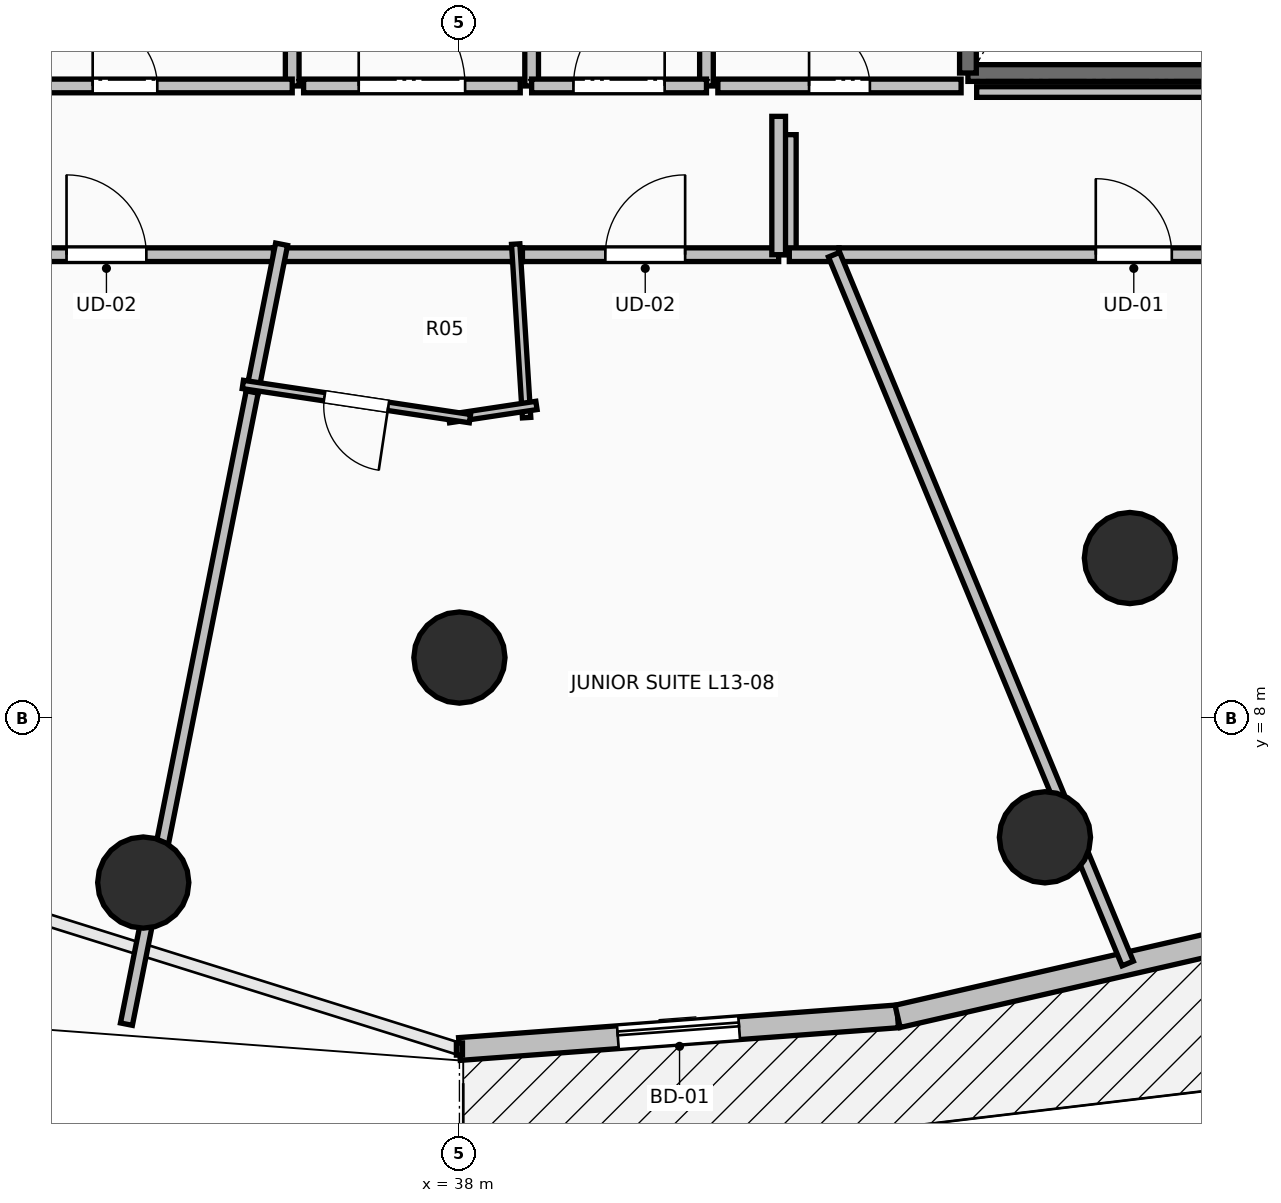
"""IFC4 building model, lengths in metres.
Left out: names, types, materials, properties, quantities, classifications, styles, units other than length and angle.
Written with IfcOpenShell. Run it as: python <this file> out.ifc"""

import sys

from ifc_helpers import new_model, si_unit, direction, frame, frame_2d, origin, origin_2d, place, context, subcontext, project, spatial, rectangle, circle, extrude, element, fill, save


model = new_model("IFC4")
c1 = context("Model", 3, precision=1e-05, world=origin(), true_north=direction((0.0, 1.0)))
c2 = subcontext(c1, "Body", "Model", "MODEL_VIEW")
j1 = project(units=[si_unit("LENGTHUNIT", "METRE"), si_unit("PLANEANGLEUNIT", "RADIAN")], contexts=[c1])
p1 = place(None, origin())
s1 = spatial("IfcSite", under=j1, at=p1, CompositionType="ELEMENT")
p2 = place(p1, origin())
s2 = spatial("IfcBuilding", under=s1, at=p2, CompositionType="ELEMENT")
p3 = place(p2, frame((0.0, 0.0, 52.0)))
s3 = spatial("IfcBuildingStorey", under=s2, at=p3, CompositionType="ELEMENT", Elevation=52.0)
for number, where, z_axis, x_axis in (
    (1, (38.0, 8.8, 0.0), (0.0, 0.0, 1.0), (0.0, -1.0, 0.0)),
    (2, (46.821, 10.109, 0.0), (0.0, 0.0, 1.0), (0.383, -0.924, 0.0)),
    (3, (33.84, 5.84, 0.0), (0.0, 0.0, 1.0), (0.0, -1.0, 0.0)),
    (4, (45.703, 6.435, 0.0), (0.0, 0.0, 1.0), (0.383, -0.924, 0.0)),
):
    element("IfcColumn", number, at=place(p3, frame(where, z_axis=z_axis, x_axis=x_axis)), inside=s3, PredefinedType="COLUMN", context=c2, shape_type="SweptSolid", body=[
        extrude(circle(Radius=0.6, at=origin_2d()), origin(), (0.0, 0.0, 1.0), 3.5),
    ])
p4 = place(p3, frame((38.0, 3.65, 0.0), z_axis=(0.0, 0.0, 1.0), x_axis=(0.99723690101, 0.074287032943, 0.0)))
e5 = element("IfcWall", 5, at=p4, inside=s3, PredefinedType="STANDARD", context=c2, shape_type="SweptSolid", body=[
    extrude(rectangle(XDim=5.781, YDim=0.3, at=frame_2d((2.89, 0.0))), origin(), (0.0, 0.0, 1.0), 3.24),
])
p5 = place(p4, frame((2.09, 0.0, 0.0)))
e6 = element("IfcOpeningElement", 6, at=p5, cuts=e5, PredefinedType="OPENING", context=c2, shape_type="SweptSolid", body=[
    extrude(rectangle(XDim=1.6, YDim=2.3, at=frame_2d((0.8, 1.15))), frame((0.0, 0.165, 0.0), z_axis=(0.0, -1.0, 0.0), x_axis=(1.0, 0.0, 0.0)), (0.0, 0.0, 1.0), 0.33),
])
p6 = place(p3, frame((43.765, 4.079, 0.0), z_axis=(0.0, 0.0, 1.0), x_axis=(0.974671141646, 0.223642942305, 0.0)))
e7 = element("IfcWall", 7, at=p6, inside=s3, PredefinedType="STANDARD", context=c2, shape_type="SweptSolid", body=[
    extrude(rectangle(XDim=5.688, YDim=0.3, at=frame_2d((2.844, 0.0))), origin(), (0.0, 0.0, 1.0), 3.24),
])
p7 = place(p3, frame((48.06, 16.49, 0.0), z_axis=(0.0, 0.0, 1.0), x_axis=(-1.0, 0.0, 0.0)))
e8 = element("IfcWall", 8, at=p7, inside=s3, PredefinedType="SOLIDWALL", context=c2, shape_type="SweptSolid", body=[
    extrude(rectangle(XDim=3.37, YDim=0.22, at=frame_2d((1.685, 0.0))), origin(), (0.0, 0.0, 1.0), 3.24),
])
p8 = place(p3, frame((44.69, 16.49, 0.0), z_axis=(0.0, 0.0, 1.0), x_axis=(0.0, 1.0, 0.0)))
e9 = element("IfcWall", 9, at=p8, inside=s3, PredefinedType="SOLIDWALL", context=c2, shape_type="SweptSolid", body=[
    extrude(rectangle(XDim=7.42, YDim=0.22, at=frame_2d((3.71, 0.0))), origin(), (0.0, 0.0, 1.0), 3.24),
])
p9 = place(p3, frame((41.25, 16.32, 0.0), z_axis=(0.0, 0.0, 1.0), x_axis=(0.0, 1.0, 0.0)))
e10 = element("IfcWall", 10, at=p9, inside=s3, PredefinedType="PARTITIONING", context=c2, shape_type="SweptSolid", body=[
    extrude(rectangle(XDim=3.985, YDim=0.18, at=frame_2d((1.992, 0.0))), origin(), (0.0, 0.0, 1.0), 3.24),
])
p10 = place(p9, frame((1.593, 0.0, 0.0)))
e11 = element("IfcOpeningElement", 11, at=p10, cuts=e10, PredefinedType="OPENING", context=c2, shape_type="SweptSolid", body=[
    extrude(rectangle(XDim=0.8, YDim=2.05, at=frame_2d((0.4, 1.025))), frame((0.0, 0.105, 0.0), z_axis=(0.0, -1.0, 0.0), x_axis=(1.0, 0.0, 0.0)), (0.0, 0.0, 1.0), 0.21),
])
p11 = place(p3, frame((38.95, 21.755, 0.0), z_axis=(0.0, 0.0, 1.0), x_axis=(0.0, -1.0, 0.0)))
e12 = element("IfcWall", 12, at=p11, inside=s3, PredefinedType="PARTITIONING", context=c2, shape_type="SweptSolid", body=[
    extrude(rectangle(XDim=5.435, YDim=0.18, at=frame_2d((2.717, 0.0))), origin(), (0.0, 0.0, 1.0), 3.24),
])
p12 = place(p11, frame((2.018, 0.0, 0.0)))
e13 = element("IfcOpeningElement", 13, at=p12, cuts=e12, PredefinedType="OPENING", context=c2, shape_type="SweptSolid", body=[
    extrude(rectangle(XDim=1.4, YDim=2.2, at=frame_2d((0.7, 1.1))), frame((0.0, 0.105, 0.0), z_axis=(0.0, -1.0, 0.0), x_axis=(1.0, 0.0, 0.0)), (0.0, 0.0, 1.0), 0.21),
])
p13 = place(p3, frame((38.95, 16.32, 0.0), z_axis=(0.0, 0.0, 1.0), x_axis=(1.0, 0.0, 0.0)))
e14 = element("IfcWall", 14, at=p13, inside=s3, PredefinedType="PARTITIONING", context=c2, shape_type="SweptSolid", body=[
    extrude(rectangle(XDim=2.3, YDim=0.18, at=frame_2d((1.15, 0.0))), origin(), (0.0, 0.0, 1.0), 3.24),
])
p14 = place(p13, frame((0.55, 0.0, 0.0)))
e15 = element("IfcOpeningElement", 15, at=p14, cuts=e14, PredefinedType="OPENING", context=c2, shape_type="SweptSolid", body=[
    extrude(rectangle(XDim=1.2, YDim=2.15, at=frame_2d((0.6, 1.075))), frame((0.0, 0.105, 0.0), z_axis=(0.0, -1.0, 0.0), x_axis=(1.0, 0.0, 0.0)), (0.0, 0.0, 1.0), 0.21),
])
p15 = place(p3, frame((41.4, 16.32, 0.0), z_axis=(0.0, 0.0, 1.0), x_axis=(1.0, 0.0, 0.0)))
e16 = element("IfcWall", 16, at=p15, inside=s3, PredefinedType="PARTITIONING", context=c2, shape_type="SweptSolid", body=[
    extrude(rectangle(XDim=3.2, YDim=0.18, at=frame_2d((1.6, 0.0))), origin(), (0.0, 0.0, 1.0), 3.24),
])
p16 = place(p15, frame((1.2, 0.0, 0.0)))
e17 = element("IfcOpeningElement", 17, at=p16, cuts=e16, PredefinedType="OPENING", context=c2, shape_type="SweptSolid", body=[
    extrude(rectangle(XDim=0.8, YDim=2.05, at=frame_2d((0.4, 1.025))), frame((0.0, 0.105, 0.0), z_axis=(0.0, -1.0, 0.0), x_axis=(1.0, 0.0, 0.0)), (0.0, 0.0, 1.0), 0.21),
])
p17 = place(p3, frame((35.8, 16.32, 0.0), z_axis=(0.0, 0.0, 1.0), x_axis=(0.0, 1.0, 0.0)))
e18 = element("IfcWall", 18, at=p17, inside=s3, PredefinedType="PARTITIONING", context=c2, shape_type="SweptSolid", body=[
    extrude(rectangle(XDim=5.13, YDim=0.18, at=frame_2d((2.565, 0.0))), origin(), (0.0, 0.0, 1.0), 3.24),
])
p18 = place(p3, frame((31.4, 16.32, 0.0), z_axis=(0.0, 0.0, 1.0), x_axis=(1.0, 0.0, 0.0)))
e19 = element("IfcWall", 19, at=p18, inside=s3, PredefinedType="PARTITIONING", context=c2, shape_type="SweptSolid", body=[
    extrude(rectangle(XDim=4.4, YDim=0.18, at=frame_2d((2.2, 0.0))), origin(), (0.0, 0.0, 1.0), 3.24),
])
p19 = place(p18, frame((1.775, 0.0, 0.0)))
e20 = element("IfcOpeningElement", 20, at=p19, cuts=e19, PredefinedType="OPENING", context=c2, shape_type="SweptSolid", body=[
    extrude(rectangle(XDim=0.85, YDim=2.1, at=frame_2d((0.425, 1.05))), frame((0.0, 0.105, 0.0), z_axis=(0.0, -1.0, 0.0), x_axis=(1.0, 0.0, 0.0)), (0.0, 0.0, 1.0), 0.21),
])
p20 = place(p3, frame((35.95, 16.32, 0.0), z_axis=(0.0, 0.0, 1.0), x_axis=(1.0, 0.0, 0.0)))
e21 = element("IfcWall", 21, at=p20, inside=s3, PredefinedType="PARTITIONING", context=c2, shape_type="SweptSolid", body=[
    extrude(rectangle(XDim=2.85, YDim=0.18, at=frame_2d((1.425, 0.0))), origin(), (0.0, 0.0, 1.0), 3.24),
])
p21 = place(p20, frame((0.725, 0.0, 0.0)))
e22 = element("IfcOpeningElement", 22, at=p21, cuts=e21, PredefinedType="OPENING", context=c2, shape_type="SweptSolid", body=[
    extrude(rectangle(XDim=1.4, YDim=2.2, at=frame_2d((0.7, 1.1))), frame((0.0, 0.105, 0.0), z_axis=(0.0, -1.0, 0.0), x_axis=(1.0, 0.0, 0.0)), (0.0, 0.0, 1.0), 0.21),
])
p22 = place(p3, frame((31.019, 14.1, 0.0), z_axis=(0.0, 0.0, 1.0), x_axis=(1.0, 0.0, 0.0)))
e23 = element("IfcWall", 23, at=p22, inside=s3, PredefinedType="PARTITIONING", context=c2, shape_type="SweptSolid", body=[
    extrude(rectangle(XDim=4.674, YDim=0.18, at=frame_2d((2.337, 0.0))), origin(), (0.0, 0.0, 1.0), 3.24),
])
p23 = place(p22, frame((1.812, 0.0, 0.0)))
e24 = element("IfcOpeningElement", 24, at=p23, cuts=e23, PredefinedType="OPENING", context=c2, shape_type="SweptSolid", body=[
    extrude(rectangle(XDim=1.05, YDim=2.2, at=frame_2d((0.525, 1.1))), frame((0.0, 0.105, 0.0), z_axis=(0.0, -1.0, 0.0), x_axis=(1.0, 0.0, 0.0)), (0.0, 0.0, 1.0), 0.21),
])
p24 = place(p3, frame((42.34, 15.679, 0.0), z_axis=(0.0, 0.0, 1.0), x_axis=(0.0, -1.0, 0.0)))
e25 = element("IfcWall", 25, at=p24, inside=s3, PredefinedType="PARTITIONING", context=c2, shape_type="SweptSolid", body=[
    extrude(rectangle(XDim=1.579, YDim=0.18, at=frame_2d((0.79, 0.0))), origin(), (0.0, 0.0, 1.0), 3.24),
])
p25 = place(p3, frame((42.34, 14.1, 0.0), z_axis=(0.0, 0.0, 1.0), x_axis=(1.0, 0.0, 0.0)))
e26 = element("IfcWall", 26, at=p25, inside=s3, PredefinedType="PARTITIONING", context=c2, shape_type="SweptSolid", body=[
    extrude(rectangle(XDim=0.654, YDim=0.18, at=frame_2d((0.327, 0.0))), origin(), (0.0, 0.0, 1.0), 3.24),
])
p26 = place(p3, frame((38.689, 14.1, 0.0), z_axis=(0.0, 0.0, 1.0), x_axis=(1.0, 0.0, 0.0)))
e27 = element("IfcWall", 27, at=p26, inside=s3, PredefinedType="PARTITIONING", context=c2, shape_type="SweptSolid", body=[
    extrude(rectangle(XDim=3.511, YDim=0.18, at=frame_2d((1.755, 0.0))), origin(), (0.0, 0.0, 1.0), 3.24),
])
p27 = place(p26, frame((1.23, 0.0, 0.0)))
e28 = element("IfcOpeningElement", 28, at=p27, cuts=e27, PredefinedType="OPENING", context=c2, shape_type="SweptSolid", body=[
    extrude(rectangle(XDim=1.05, YDim=2.2, at=frame_2d((0.525, 1.1))), frame((0.0, 0.105, 0.0), z_axis=(0.0, -1.0, 0.0), x_axis=(1.0, 0.0, 0.0)), (0.0, 0.0, 1.0), 0.21),
])
p28 = place(p3, frame((42.2, 14.1, 0.0), z_axis=(0.0, 0.0, 1.0), x_axis=(0.0, 1.0, 0.0)))
e29 = element("IfcWall", 29, at=p28, inside=s3, PredefinedType="PARTITIONING", context=c2, shape_type="SweptSolid", body=[
    extrude(rectangle(XDim=1.82, YDim=0.18, at=frame_2d((0.91, 0.0))), origin(), (0.0, 0.0, 1.0), 3.24),
])
p29 = place(p3, frame((35.553, 14.1, 0.0), z_axis=(0.0, 0.0, 1.0), x_axis=(1.0, 0.0, 0.0)))
e30 = element("IfcWall", 30, at=p29, inside=s3, PredefinedType="PARTITIONING", context=c2, shape_type="SweptSolid", body=[
    extrude(rectangle(XDim=3.276, YDim=0.18, at=frame_2d((1.638, 0.0))), origin(), (0.0, 0.0, 1.0), 3.24),
])
p30 = place(p3, frame((42.994, 14.1, 0.0), z_axis=(0.0, 0.0, 1.0), x_axis=(1.0, 0.0, 0.0)))
e31 = element("IfcWall", 31, at=p30, inside=s3, PredefinedType="PARTITIONING", context=c2, shape_type="SweptSolid", body=[
    extrude(rectangle(XDim=7.756, YDim=0.18, at=frame_2d((3.878, 0.0))), origin(), (0.0, 0.0, 1.0), 2.432),
])
p31 = place(p30, frame((3.378, 0.0, 0.0)))
e32 = element("IfcOpeningElement", 32, at=p31, cuts=e31, PredefinedType="OPENING", context=c2, shape_type="SweptSolid", body=[
    extrude(rectangle(XDim=1.0, YDim=2.15, at=frame_2d((0.5, 1.075))), frame((0.0, 0.105, 0.0), z_axis=(0.0, -1.0, 0.0), x_axis=(1.0, 0.0, 0.0)), (0.0, 0.0, 1.0), 0.21),
])
p32 = place(p3, frame((33.619, 3.977, 0.0), z_axis=(0.0, 0.0, 1.0), x_axis=(0.195151937053, 0.980773022398, 0.0)))
e33 = element("IfcWall", 33, at=p32, inside=s3, PredefinedType="PARTITIONING", context=c2, shape_type="SweptSolid", body=[
    extrude(rectangle(XDim=8.62, YDim=0.16, at=frame_2d((4.31, 0.0))), origin(), (0.0, 0.0, 1.0), 2.432),
])
p33 = place(p3, frame((35.274, 12.294, 0.0), z_axis=(0.0, 0.0, 1.0), x_axis=(0.194907646023, 0.980821599233, 0.0)))
e34 = element("IfcWall", 34, at=p33, inside=s3, PredefinedType="PARTITIONING", context=c2, shape_type="SweptSolid", body=[
    extrude(rectangle(XDim=1.982, YDim=0.16, at=frame_2d((0.991, 0.0))), origin(), (0.0, 0.0, 1.0), 2.886),
])
p34 = place(p3, frame((38.74, 14.24, 0.0), z_axis=(0.0, 0.0, 1.0), x_axis=(0.062743659702, -0.998029675494, 0.0)))
e35 = element("IfcWall", 35, at=p34, inside=s3, PredefinedType="PARTITIONING", context=c2, shape_type="SweptSolid", body=[
    extrude(rectangle(XDim=2.288, YDim=0.11, at=frame_2d((1.144, 0.0))), origin(), (0.0, 0.0, 1.0), 2.886),
])
p35 = place(p3, frame((39.013, 12.117, 0.0), z_axis=(0.0, 0.0, 1.0), x_axis=(-0.988803754909, -0.14922176208, 0.0)))
e36 = element("IfcWall", 36, at=p35, inside=s3, PredefinedType="PARTITIONING", context=c2, shape_type="SweptSolid", body=[
    extrude(rectangle(XDim=1.165, YDim=0.11, at=frame_2d((0.583, 0.0))), origin(), (0.0, 0.0, 1.0), 3.24),
])
p36 = place(p3, frame((38.138, 11.943, 0.0), z_axis=(0.0, 0.0, 1.0), x_axis=(-0.988861549405, 0.148838288446, 0.0)))
e37 = element("IfcWall", 37, at=p36, inside=s3, PredefinedType="PARTITIONING", context=c2, shape_type="SweptSolid", body=[
    extrude(rectangle(XDim=3.021, YDim=0.11, at=frame_2d((1.511, 0.0))), origin(), (0.0, 0.0, 1.0), 3.24),
])
p37 = place(p36, frame((1.086, 0.0, 0.0)))
e38 = element("IfcOpeningElement", 38, at=p37, cuts=e37, PredefinedType="OPENING", context=c2, shape_type="SweptSolid", body=[
    extrude(rectangle(XDim=0.85, YDim=2.1, at=frame_2d((0.425, 1.05))), frame((0.0, 0.07, 0.0), z_axis=(0.0, -1.0, 0.0), x_axis=(1.0, 0.0, 0.0)), (0.0, 0.0, 1.0), 0.14),
])
p38 = place(p3, frame((46.792, 4.775, 0.0), z_axis=(0.0, 0.0, 1.0), x_axis=(-0.382718503749, 0.923865004689, 0.0)))
e39 = element("IfcWall", 39, at=p38, inside=s3, PredefinedType="PARTITIONING", context=c2, shape_type="SweptSolid", body=[
    extrude(rectangle(XDim=10.094, YDim=0.16, at=frame_2d((5.047, 0.0))), origin(), (0.0, 0.0, 1.0), 2.432),
])
p39 = place(p3, frame((48.55, 16.24, 0.0), z_axis=(0.0, 0.0, 1.0), x_axis=(-1.0, 0.0, 0.0)))
e40 = element("IfcWall", 40, at=p39, inside=s3, PredefinedType="PARTITIONING", context=c2, shape_type="SweptSolid", body=[
    extrude(rectangle(XDim=3.745, YDim=0.14, at=frame_2d((1.873, 0.0))), origin(), (0.0, 0.0, 1.0), 2.432),
])
p40 = place(p5, origin())
e41 = element("IfcDoor", 41, at=p40, inside=s3, OperationType="SLIDING_TO_LEFT", PredefinedType="DOOR", context=c2, shape_type="SweptSolid", body=[
    extrude(rectangle(XDim=1.6, YDim=2.3, at=frame_2d((0.8, 1.15))), frame((0.0, 0.025, 0.0), z_axis=(0.0, -1.0, 0.0), x_axis=(1.0, 0.0, 0.0)), (0.0, 0.0, 1.0), 0.05),
])
fill(e6, e41)
p41 = place(p14, origin())
e42 = element("IfcDoor", 42, at=p41, inside=s3, OperationType="SINGLE_SWING_RIGHT", PredefinedType="DOOR", context=c2, shape_type="SweptSolid", body=[
    extrude(rectangle(XDim=1.2, YDim=2.15, at=frame_2d((0.6, 1.075))), frame((0.0, 0.025, 0.0), z_axis=(0.0, -1.0, 0.0), x_axis=(1.0, 0.0, 0.0)), (0.0, 0.0, 1.0), 0.05),
])
fill(e15, e42)
p42 = place(p16, origin())
e43 = element("IfcDoor", 43, at=p42, inside=s3, OperationType="SINGLE_SWING_LEFT", PredefinedType="DOOR", context=c2, shape_type="SweptSolid", body=[
    extrude(rectangle(XDim=0.8, YDim=2.05, at=frame_2d((0.4, 1.025))), frame((0.0, 0.025, 0.0), z_axis=(0.0, -1.0, 0.0), x_axis=(1.0, 0.0, 0.0)), (0.0, 0.0, 1.0), 0.05),
])
fill(e17, e43)
p43 = place(p19, origin())
e44 = element("IfcDoor", 44, at=p43, inside=s3, OperationType="SINGLE_SWING_LEFT", PredefinedType="DOOR", context=c2, shape_type="SweptSolid", body=[
    extrude(rectangle(XDim=0.85, YDim=2.1, at=frame_2d((0.425, 1.05))), frame((0.0, 0.025, 0.0), z_axis=(0.0, -1.0, 0.0), x_axis=(1.0, 0.0, 0.0)), (0.0, 0.0, 1.0), 0.05),
])
fill(e20, e44)
p44 = place(p21, origin())
e45 = element("IfcDoor", 45, at=p44, inside=s3, OperationType="DOUBLE_SWING_LEFT", PredefinedType="DOOR", context=c2, shape_type="SweptSolid", body=[
    extrude(rectangle(XDim=1.4, YDim=2.2, at=frame_2d((0.7, 1.1))), frame((0.0, 0.025, 0.0), z_axis=(0.0, -1.0, 0.0), x_axis=(1.0, 0.0, 0.0)), (0.0, 0.0, 1.0), 0.05),
])
fill(e22, e45)
p45 = place(p23, origin())
e46 = element("IfcDoor", 46, at=p45, inside=s3, OperationType="SINGLE_SWING_LEFT", PredefinedType="DOOR", context=c2, shape_type="SweptSolid", body=[
    extrude(rectangle(XDim=1.05, YDim=2.2, at=frame_2d((0.525, 1.1))), frame((0.0, 0.025, 0.0), z_axis=(0.0, -1.0, 0.0), x_axis=(1.0, 0.0, 0.0)), (0.0, 0.0, 1.0), 0.05),
])
fill(e24, e46)
p46 = place(p27, origin())
e47 = element("IfcDoor", 47, at=p46, inside=s3, OperationType="SINGLE_SWING_RIGHT", PredefinedType="DOOR", context=c2, shape_type="SweptSolid", body=[
    extrude(rectangle(XDim=1.05, YDim=2.2, at=frame_2d((0.525, 1.1))), frame((0.0, 0.025, 0.0), z_axis=(0.0, -1.0, 0.0), x_axis=(1.0, 0.0, 0.0)), (0.0, 0.0, 1.0), 0.05),
])
fill(e28, e47)
p47 = place(p31, origin())
e48 = element("IfcDoor", 48, at=p47, inside=s3, OperationType="SINGLE_SWING_LEFT", PredefinedType="DOOR", context=c2, shape_type="SweptSolid", body=[
    extrude(rectangle(XDim=1.0, YDim=2.15, at=frame_2d((0.5, 1.075))), frame((0.0, 0.025, 0.0), z_axis=(0.0, -1.0, 0.0), x_axis=(1.0, 0.0, 0.0)), (0.0, 0.0, 1.0), 0.05),
])
fill(e32, e48)
p48 = place(p37, origin())
e49 = element("IfcDoor", 49, at=p48, inside=s3, OperationType="SINGLE_SWING_LEFT", PredefinedType="DOOR", context=c2, shape_type="SweptSolid", body=[
    extrude(rectangle(XDim=0.85, YDim=2.1, at=frame_2d((0.425, 1.05))), frame((0.0, 0.025, 0.0), z_axis=(0.0, -1.0, 0.0), x_axis=(1.0, 0.0, 0.0)), (0.0, 0.0, 1.0), 0.05),
])
fill(e38, e49)
save(model, sys.argv[1])
